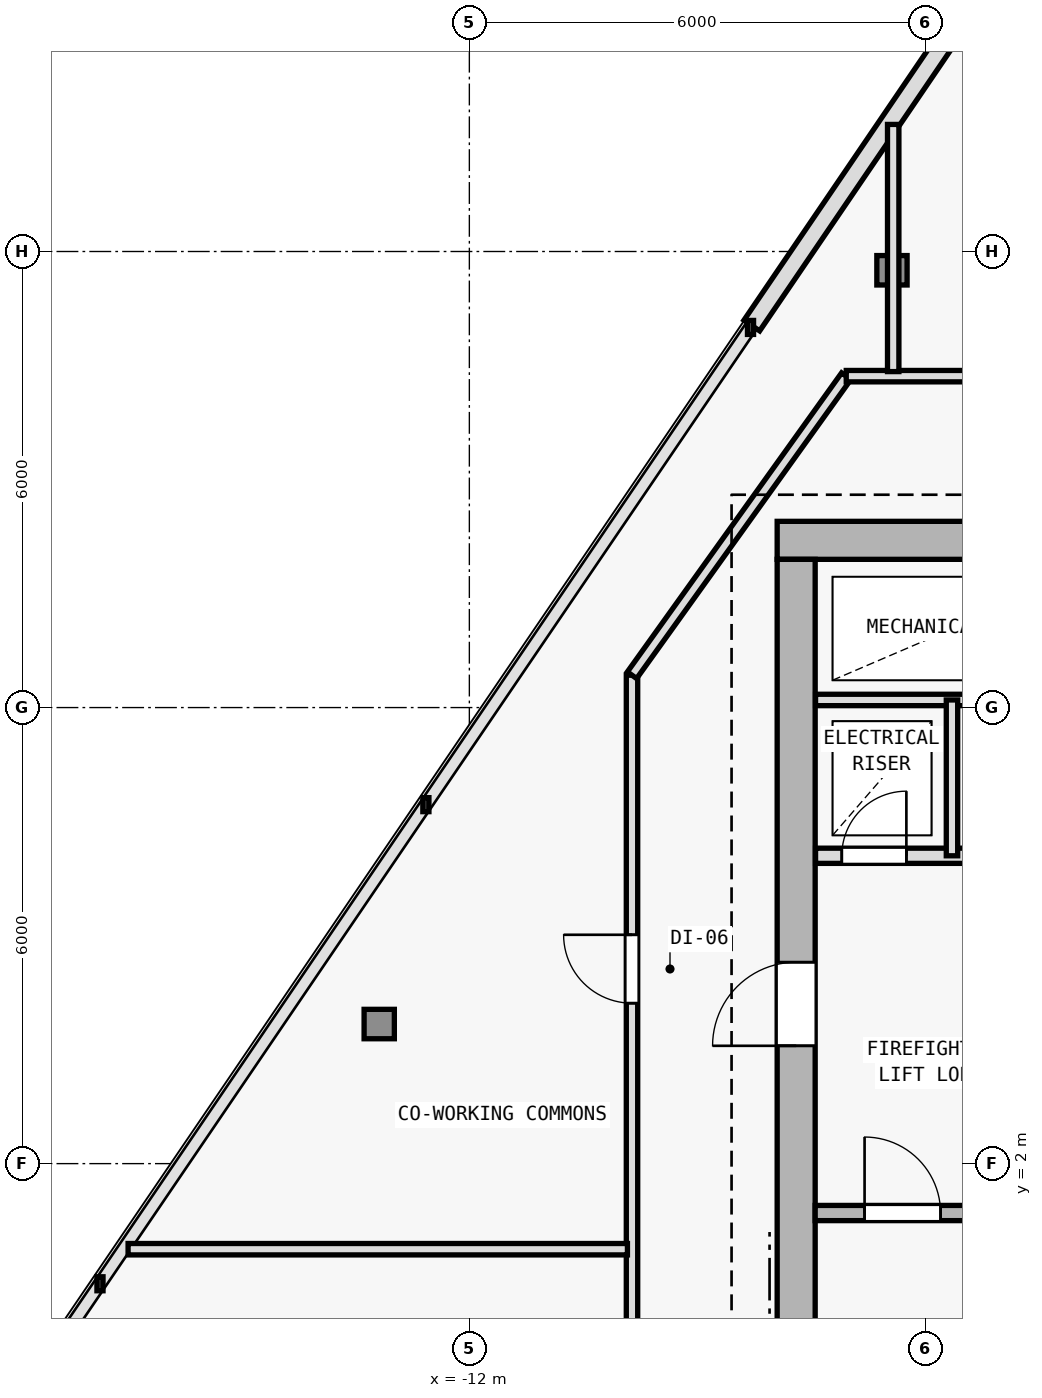
"""IFC4 building model, lengths in metres.
Left out: names, types, materials, properties, quantities, classifications, styles, units other than length and angle.
Written with IfcOpenShell. Run it as: python <this file> out.ifc"""

import sys

from ifc_helpers import new_model, si_unit, direction, frame, frame_2d, origin, origin_2d, place, context, subcontext, project, spatial, rectangle, i_section, extrude, element, fill, save


model = new_model("IFC4")
c1 = context("Model", 3, precision=1e-05, world=origin(), true_north=direction((0.0, 1.0)))
c2 = subcontext(c1, "Body", "Model", "MODEL_VIEW")
j1 = project(units=[si_unit("LENGTHUNIT", "METRE"), si_unit("PLANEANGLEUNIT", "RADIAN")], contexts=[c1])
p1 = place(None, origin())
s1 = spatial("IfcSite", under=j1, at=p1, CompositionType="ELEMENT")
p2 = place(p1, origin())
s2 = spatial("IfcBuilding", under=s1, at=p2, CompositionType="ELEMENT")
p3 = place(p2, frame((0.0, 0.0, 209.1)))
s3 = spatial("IfcBuildingStorey", under=s2, at=p3, CompositionType="ELEMENT", Elevation=209.1)
for number, where, z_axis, x_axis in (
    (1, (-7.7, 10.2, 0.0), (0.0, 0.0, 1.0), (1.0, 0.0, 0.0)),
    (2, (-7.7, 2.0, 0.0), (0.0, 0.0, 1.0), (1.0, 0.0, 0.0)),
):
    element("IfcColumn", number, at=place(p3, frame(where, z_axis=z_axis, x_axis=x_axis)), inside=s3, PredefinedType="COLUMN", context=c2, shape_type="SweptSolid", body=[
        extrude(i_section(OverallWidth=0.398, OverallDepth=0.387, WebThickness=0.013, FlangeThickness=0.022, FilletRadius=0.015, at=origin_2d()), origin(), (0.0, 0.0, 1.0), 3.6),
    ])
p4 = place(p3, frame((-6.44, 13.753, 0.005), z_axis=(0.009046603167, -0.002584743762, 0.999955738056), x_axis=(0.274721127897, 0.961523947641, 0.0)))
e3 = element("IfcColumn", 3, at=p4, inside=s3, PredefinedType="COLUMN", context=c2, shape_type="SweptSolid", body=[
    extrude(i_section(OverallWidth=0.398, OverallDepth=0.387, WebThickness=0.013, FlangeThickness=0.022, FilletRadius=0.015, at=origin_2d()), origin(), (0.0, 0.0, 1.0), 3.589),
])
p5 = place(p3, frame((-13.186, 3.836, 0.005), z_axis=(0.017478283334, 0.009861288262, 0.999798612024), x_axis=(-0.491387103822, 0.870941280568, 0.0)))
e4 = element("IfcColumn", 4, at=p5, inside=s3, PredefinedType="COLUMN", context=c2, shape_type="SweptSolid", body=[
    extrude(i_section(OverallWidth=0.398, OverallDepth=0.387, WebThickness=0.013, FlangeThickness=0.022, FilletRadius=0.015, at=origin_2d()), origin(), (0.0, 0.0, 1.0), 3.59),
])
p6 = place(p3, frame((-8.284, 13.026, 0.0), z_axis=(0.0, 0.0, 1.0), x_axis=(0.562468945091, 0.826818411629, 0.0)))
e5 = element("IfcWall", 5, at=p6, inside=s3, PredefinedType="SOLIDWALL", context=c2, shape_type="SweptSolid", body=[
    extrude(rectangle(XDim=10.714, YDim=0.25, at=frame_2d((5.357, 0.0))), origin(), (0.0, 0.0, 1.0), 3.35),
])
p7 = place(p6, frame((4.607, 0.0, 0.62)))
e6 = element("IfcOpeningElement", 6, at=p7, cuts=e5, PredefinedType="OPENING", context=c2, shape_type="SweptSolid", body=[
    extrude(rectangle(XDim=1.5, YDim=2.0, at=frame_2d((0.75, 1.0))), frame((0.0, 0.135, 0.0), z_axis=(0.0, -1.0, 0.0), x_axis=(1.0, 0.0, 0.0)), (0.0, 0.0, 1.0), 0.27),
])
p8 = place(p3, frame((7.95, 10.2, 0.0), z_axis=(0.0, 0.0, 1.0), x_axis=(-1.0, 0.0, 0.0)))
e7 = element("IfcWall", 7, at=p8, inside=s3, PredefinedType="SHEAR", context=c2, shape_type="SweptSolid", body=[
    extrude(rectangle(XDim=15.9, YDim=0.5, at=frame_2d((7.95, 0.0))), origin(), (0.0, 0.0, 1.0), 3.35),
])
p9 = place(p8, frame((4.4, 0.0, 0.0)))
e8 = element("IfcOpeningElement", 8, at=p9, cuts=e7, PredefinedType="OPENING", context=c2, shape_type="SweptSolid", body=[
    extrude(rectangle(XDim=1.1, YDim=2.15, at=frame_2d((0.55, 1.075))), frame((0.0, 0.26, 0.0), z_axis=(0.0, -1.0, 0.0), x_axis=(1.0, 0.0, 0.0)), (0.0, 0.0, 1.0), 0.52),
])
p10 = place(p3, frame((-7.7, -9.15, 0.0), z_axis=(0.0, 0.0, 1.0), x_axis=(0.0, 1.0, 0.0)))
e9 = element("IfcWall", 9, at=p10, inside=s3, PredefinedType="SHEAR", context=c2, shape_type="SweptSolid", body=[
    extrude(rectangle(XDim=19.1, YDim=0.5, at=frame_2d((9.55, 0.0))), origin(), (0.0, 0.0, 1.0), 3.35),
])
p11 = place(p10, frame((12.7, 0.0, 0.0)))
e10 = element("IfcOpeningElement", 10, at=p11, cuts=e9, PredefinedType="OPENING", context=c2, shape_type="SweptSolid", body=[
    extrude(rectangle(XDim=1.1, YDim=2.15, at=frame_2d((0.55, 1.075))), frame((0.0, 0.26, 0.0), z_axis=(0.0, -1.0, 0.0), x_axis=(1.0, 0.0, 0.0)), (0.0, 0.0, 1.0), 0.52),
])
p12 = place(p3, frame((-7.45, 1.35, 0.0), z_axis=(0.0, 0.0, 1.0), x_axis=(1.0, 0.0, 0.0)))
e11 = element("IfcWall", 11, at=p12, inside=s3, PredefinedType="SOLIDWALL", context=c2, shape_type="SweptSolid", body=[
    extrude(rectangle(XDim=3.4, YDim=0.2, at=frame_2d((1.7, 0.0))), origin(), (0.0, 0.0, 1.0), 3.35),
])
p13 = place(p12, frame((0.65, 0.0, 0.0)))
e12 = element("IfcOpeningElement", 12, at=p13, cuts=e11, PredefinedType="OPENING", context=c2, shape_type="SweptSolid", body=[
    extrude(rectangle(XDim=1.0, YDim=2.15, at=frame_2d((0.5, 1.075))), frame((0.0, 0.11, 0.0), z_axis=(0.0, -1.0, 0.0), x_axis=(1.0, 0.0, 0.0)), (0.0, 0.0, 1.0), 0.22),
])
p14 = place(p3, frame((-7.445, 6.05, 0.0), z_axis=(0.0, 0.0, 1.0), x_axis=(1.0, 0.0, 0.0)))
e13 = element("IfcWall", 13, at=p14, inside=s3, PredefinedType="SOLIDWALL", context=c2, shape_type="SweptSolid", body=[
    extrude(rectangle(XDim=3.595, YDim=0.2, at=frame_2d((1.797, 0.0))), origin(), (0.0, 0.0, 1.0), 3.35),
])
p15 = place(p14, frame((0.345, 0.0, 0.0)))
e14 = element("IfcOpeningElement", 14, at=p15, cuts=e13, PredefinedType="OPENING", context=c2, shape_type="SweptSolid", body=[
    extrude(rectangle(XDim=0.85, YDim=2.1, at=frame_2d((0.425, 1.05))), frame((0.0, 0.11, 0.0), z_axis=(0.0, -1.0, 0.0), x_axis=(1.0, 0.0, 0.0)), (0.0, 0.0, 1.0), 0.22),
])
p16 = place(p14, frame((2.145, 0.0, 0.0)))
e15 = element("IfcOpeningElement", 15, at=p16, cuts=e13, PredefinedType="OPENING", context=c2, shape_type="SweptSolid", body=[
    extrude(rectangle(XDim=0.85, YDim=2.1, at=frame_2d((0.425, 1.05))), frame((0.0, 0.11, 0.0), z_axis=(0.0, -1.0, 0.0), x_axis=(1.0, 0.0, 0.0)), (0.0, 0.0, 1.0), 0.22),
])
p17 = place(p3, frame((-7.445, 8.1, 0.0), z_axis=(0.0, 0.0, 1.0), x_axis=(1.0, 0.0, 0.0)))
e16 = element("IfcWall", 16, at=p17, inside=s3, PredefinedType="PARTITIONING", context=c2, shape_type="SweptSolid", body=[
    extrude(rectangle(XDim=3.595, YDim=0.15, at=frame_2d((1.797, 0.0))), origin(), (0.0, 0.0, 1.0), 3.35),
])
p18 = place(p3, frame((-5.65, 6.05, 0.0), z_axis=(0.0, 0.0, 1.0), x_axis=(0.0, 1.0, 0.0)))
e17 = element("IfcWall", 17, at=p18, inside=s3, PredefinedType="PARTITIONING", context=c2, shape_type="SweptSolid", body=[
    extrude(rectangle(XDim=2.05, YDim=0.15, at=frame_2d((1.025, 0.0))), origin(), (0.0, 0.0, 1.0), 3.35),
])
p19 = place(p3, frame((-9.86, -11.56, 0.0), z_axis=(0.0, 0.0, 1.0), x_axis=(0.0, 1.0, 0.0)))
e18 = element("IfcWall", 18, at=p19, inside=s3, PredefinedType="PARTITIONING", context=c2, shape_type="SweptSolid", body=[
    extrude(rectangle(XDim=19.986, YDim=0.15, at=frame_2d((9.993, 0.0))), origin(), (0.0, 0.0, 1.0), 2.825),
])
p20 = place(p19, frame((8.527, 0.0, 0.0)))
e19 = element("IfcOpeningElement", 19, at=p20, cuts=e18, PredefinedType="OPENING", context=c2, shape_type="SweptSolid", body=[
    extrude(rectangle(XDim=0.9, YDim=2.1, at=frame_2d((0.45, 1.05))), frame((0.0, 0.085, 0.0), z_axis=(0.0, -1.0, 0.0), x_axis=(1.0, 0.0, 0.0)), (0.0, 0.0, 1.0), 0.17),
])
p21 = place(p19, frame((4.449, 0.0, 0.0)))
e20 = element("IfcOpeningElement", 20, at=p21, cuts=e18, PredefinedType="OPENING", context=c2, shape_type="SweptSolid", body=[
    extrude(rectangle(XDim=0.85, YDim=2.1, at=frame_2d((0.425, 1.05))), frame((0.0, 0.085, 0.0), z_axis=(0.0, -1.0, 0.0), x_axis=(1.0, 0.0, 0.0)), (0.0, 0.0, 1.0), 0.17),
])
p22 = place(p19, frame((3.121, 0.0, 0.0)))
e21 = element("IfcOpeningElement", 21, at=p22, cuts=e18, PredefinedType="OPENING", context=c2, shape_type="SweptSolid", body=[
    extrude(rectangle(XDim=0.85, YDim=2.1, at=frame_2d((0.425, 1.05))), frame((0.0, 0.085, 0.0), z_axis=(0.0, -1.0, 0.0), x_axis=(1.0, 0.0, 0.0)), (0.0, 0.0, 1.0), 0.17),
])
p23 = place(p19, frame((1.07, 0.0, 0.0)))
e22 = element("IfcOpeningElement", 22, at=p23, cuts=e18, PredefinedType="OPENING", context=c2, shape_type="SweptSolid", body=[
    extrude(rectangle(XDim=0.9, YDim=2.1, at=frame_2d((0.45, 1.05))), frame((0.0, 0.085, 0.0), z_axis=(0.0, -1.0, 0.0), x_axis=(1.0, 0.0, 0.0)), (0.0, 0.0, 1.0), 0.17),
])
p24 = place(p19, frame((15.671, 0.0, 0.0)))
e23 = element("IfcOpeningElement", 23, at=p24, cuts=e18, PredefinedType="OPENING", context=c2, shape_type="SweptSolid", body=[
    extrude(rectangle(XDim=0.9, YDim=2.1, at=frame_2d((0.45, 1.05))), frame((0.0, 0.085, 0.0), z_axis=(0.0, -1.0, 0.0), x_axis=(1.0, 0.0, 0.0)), (0.0, 0.0, 1.0), 0.17),
])
p25 = place(p3, frame((-9.86, 8.426, 0.0), z_axis=(0.0, 0.0, 1.0), x_axis=(0.582449511476, 0.812866881218, 0.0)))
e24 = element("IfcWall", 24, at=p25, inside=s3, PredefinedType="PARTITIONING", context=c2, shape_type="SweptSolid", body=[
    extrude(rectangle(XDim=4.84, YDim=0.15, at=frame_2d((2.42, 0.0))), origin(), (0.0, 0.0, 1.0), 2.975),
])
p26 = place(p3, frame((-7.041, 12.36, 0.0), z_axis=(0.0, 0.0, 1.0), x_axis=(1.0, 0.0, 0.0)))
e25 = element("IfcWall", 25, at=p26, inside=s3, PredefinedType="PARTITIONING", context=c2, shape_type="SweptSolid", body=[
    extrude(rectangle(XDim=14.064, YDim=0.15, at=frame_2d((7.032, 0.0))), origin(), (0.0, 0.0, 1.0), 2.975),
])
p27 = place(p26, frame((12.27, 0.0, 0.0)))
e26 = element("IfcOpeningElement", 26, at=p27, cuts=e25, PredefinedType="OPENING", context=c2, shape_type="SweptSolid", body=[
    extrude(rectangle(XDim=0.9, YDim=2.1, at=frame_2d((0.45, 1.05))), frame((0.0, 0.085, 0.0), z_axis=(0.0, -1.0, 0.0), x_axis=(1.0, 0.0, 0.0)), (0.0, 0.0, 1.0), 0.17),
])
p28 = place(p26, frame((9.448, 0.0, 0.0)))
e27 = element("IfcOpeningElement", 27, at=p28, cuts=e25, PredefinedType="OPENING", context=c2, shape_type="SweptSolid", body=[
    extrude(rectangle(XDim=0.9, YDim=2.1, at=frame_2d((0.45, 1.05))), frame((0.0, 0.085, 0.0), z_axis=(0.0, -1.0, 0.0), x_axis=(1.0, 0.0, 0.0)), (0.0, 0.0, 1.0), 0.17),
])
p29 = place(p26, frame((6.619, 0.0, 0.0)))
e28 = element("IfcOpeningElement", 28, at=p29, cuts=e25, PredefinedType="OPENING", context=c2, shape_type="SweptSolid", body=[
    extrude(rectangle(XDim=0.9, YDim=2.1, at=frame_2d((0.45, 1.05))), frame((0.0, 0.085, 0.0), z_axis=(0.0, -1.0, 0.0), x_axis=(1.0, 0.0, 0.0)), (0.0, 0.0, 1.0), 0.17),
])
p30 = place(p26, frame((2.806, 0.0, 0.0)))
e29 = element("IfcOpeningElement", 29, at=p30, cuts=e25, PredefinedType="OPENING", context=c2, shape_type="SweptSolid", body=[
    extrude(rectangle(XDim=0.9, YDim=2.1, at=frame_2d((0.45, 1.05))), frame((0.0, 0.085, 0.0), z_axis=(0.0, -1.0, 0.0), x_axis=(1.0, 0.0, 0.0)), (0.0, 0.0, 1.0), 0.17),
])
p31 = place(p3, frame((-6.423, 12.42, 0.0), z_axis=(0.0, 0.0, 1.0), x_axis=(0.0, 1.0, 0.0)))
e30 = element("IfcWall", 30, at=p31, inside=s3, PredefinedType="PARTITIONING", context=c2, shape_type="SweptSolid", body=[
    extrude(rectangle(XDim=3.252, YDim=0.15, at=frame_2d((1.626, 0.0))), origin(), (0.0, 0.0, 1.0), 2.975),
])
p32 = place(p3, frame((-9.92, 0.874, 0.0), z_axis=(0.0, 0.0, 1.0), x_axis=(-1.0, 0.0, 0.0)))
e31 = element("IfcWall", 31, at=p32, inside=s3, PredefinedType="PARTITIONING", context=c2, shape_type="SweptSolid", body=[
    extrude(rectangle(XDim=6.57, YDim=0.15, at=frame_2d((3.285, 0.0))), origin(), (0.0, 0.0, 1.0), 2.825),
])
p33 = place(p11, origin())
e32 = element("IfcDoor", 32, at=p33, inside=s3, OperationType="SINGLE_SWING_LEFT", PredefinedType="DOOR", context=c2, shape_type="SweptSolid", body=[
    extrude(rectangle(XDim=1.1, YDim=2.15, at=frame_2d((0.55, 1.075))), frame((0.0, 0.025, 0.0), z_axis=(0.0, -1.0, 0.0), x_axis=(1.0, 0.0, 0.0)), (0.0, 0.0, 1.0), 0.05),
])
fill(e10, e32)
p34 = place(p13, origin())
e33 = element("IfcDoor", 33, at=p34, inside=s3, OperationType="SINGLE_SWING_LEFT", PredefinedType="DOOR", context=c2, shape_type="SweptSolid", body=[
    extrude(rectangle(XDim=1.0, YDim=2.15, at=frame_2d((0.5, 1.075))), frame((0.0, 0.025, 0.0), z_axis=(0.0, -1.0, 0.0), x_axis=(1.0, 0.0, 0.0)), (0.0, 0.0, 1.0), 0.05),
])
fill(e12, e33)
p35 = place(p15, origin())
e34 = element("IfcDoor", 34, at=p35, inside=s3, OperationType="SINGLE_SWING_RIGHT", PredefinedType="DOOR", context=c2, shape_type="SweptSolid", body=[
    extrude(rectangle(XDim=0.85, YDim=2.1, at=frame_2d((0.425, 1.05))), frame((0.0, 0.025, 0.0), z_axis=(0.0, -1.0, 0.0), x_axis=(1.0, 0.0, 0.0)), (0.0, 0.0, 1.0), 0.05),
])
fill(e14, e34)
p36 = place(p24, origin())
e35 = element("IfcDoor", 35, at=p36, inside=s3, OperationType="SINGLE_SWING_RIGHT", PredefinedType="DOOR", context=c2, shape_type="SweptSolid", body=[
    extrude(rectangle(XDim=0.9, YDim=2.1, at=frame_2d((0.45, 1.05))), frame((0.0, 0.025, 0.0), z_axis=(0.0, -1.0, 0.0), x_axis=(1.0, 0.0, 0.0)), (0.0, 0.0, 1.0), 0.05),
])
fill(e23, e35)
save(model, sys.argv[1])
